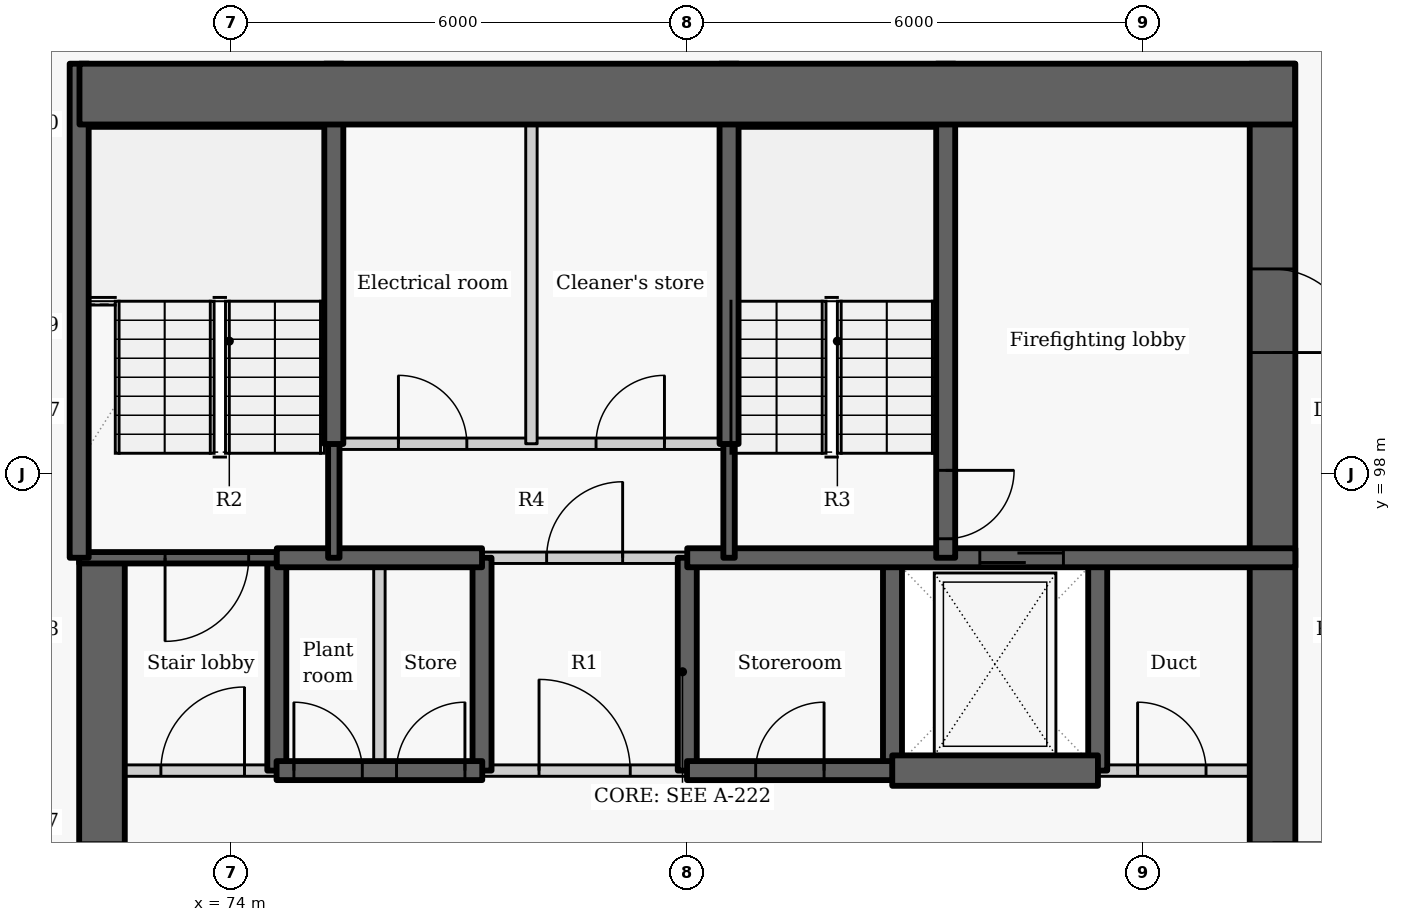
"""IFC4 building model, lengths in metres.
Left out: names, types, materials, properties, quantities, classifications, styles, units other than length and angle.
Written with IfcOpenShell. Run it as: python <this file> out.ifc"""

import sys

from ifc_helpers import new_model, si_unit, direction, frame, frame_2d, origin, place, context, subcontext, project, spatial, rectangle, extrude, element, fill, save


model = new_model("IFC4")
c1 = context("Model", 3, precision=1e-05, world=origin(), true_north=direction((0.0, 1.0)))
c2 = subcontext(c1, "Body", "Model", "MODEL_VIEW")
j1 = project(units=[si_unit("LENGTHUNIT", "METRE"), si_unit("PLANEANGLEUNIT", "RADIAN")], contexts=[c1])
p1 = place(None, origin())
s1 = spatial("IfcSite", under=j1, at=p1, CompositionType="ELEMENT")
p2 = place(p1, origin())
s2 = spatial("IfcBuilding", under=s1, at=p2, CompositionType="ELEMENT")
p3 = place(p2, frame((0.0, 0.0, 117.3)))
s3 = spatial("IfcBuildingStorey", under=s2, at=p3, CompositionType="ELEMENT", Elevation=117.3)
p4 = place(p3, frame((74.6, 94.1, -0.275), z_axis=(0.0, 0.0, 1.0), x_axis=(0.0, 1.0, 0.0)))
e1 = element("IfcWall", 1, at=p4, inside=s3, PredefinedType="SHEAR", context=c2, shape_type="SweptSolid", body=[
    extrude(rectangle(XDim=2.8, YDim=0.25, at=frame_2d((1.4, 0.0))), origin(), (0.0, 0.0, 1.0), 3.225),
])
p5 = place(p3, frame((72.3, 87.8, -0.275), z_axis=(0.0, 0.0, 1.0), x_axis=(0.0, 1.0, 0.0)))
e2 = element("IfcWall", 2, at=p5, inside=s3, PredefinedType="SHEAR", context=c2, shape_type="SweptSolid", body=[
    extrude(rectangle(XDim=9.1, YDim=0.6, at=frame_2d((4.55, 0.0))), origin(), (0.0, 0.0, 1.0), 3.225),
])
p6 = place(p5, frame((3.85, 0.0, 0.275)))
e3 = element("IfcOpeningElement", 3, at=p6, cuts=e2, PredefinedType="OPENING", context=c2, shape_type="SweptSolid", body=[
    extrude(rectangle(XDim=1.5, YDim=2.1, at=frame_2d((0.75, 1.05))), frame((0.0, 0.31, 0.0), z_axis=(0.0, -1.0, 0.0), x_axis=(1.0, 0.0, 0.0)), (0.0, 0.0, 1.0), 0.62),
])
for number, where, z_axis, x_axis in (
    (4, (77.3, 94.1, -0.275), (0.0, 0.0, 1.0), (0.0, 1.0, 0.0)),
    (5, (80.0, 94.1, -0.275), (0.0, 0.0, 1.0), (0.0, 1.0, 0.0)),
    (6, (82.7, 94.1, -0.275), (0.0, 0.0, 1.0), (0.0, 1.0, 0.0)),
    (7, (85.4, 94.1, -0.275), (0.0, 0.0, 1.0), (0.0, 1.0, 0.0)),
):
    element("IfcWall", number, at=place(p3, frame(where, z_axis=z_axis, x_axis=x_axis)), inside=s3, PredefinedType="SHEAR", context=c2, shape_type="SweptSolid", body=[
        extrude(rectangle(XDim=2.8, YDim=0.25, at=frame_2d((1.4, 0.0))), origin(), (0.0, 0.0, 1.0), 3.225),
    ])
p7 = place(p3, frame((87.7, 103.4, -0.275), z_axis=(0.0, 0.0, 1.0), x_axis=(0.0, -1.0, 0.0)))
e8 = element("IfcWall", 8, at=p7, inside=s3, PredefinedType="SHEAR", context=c2, shape_type="SweptSolid", body=[
    extrude(rectangle(XDim=15.6, YDim=0.6, at=frame_2d((7.8, 0.0))), origin(), (0.0, 0.0, 1.0), 3.225),
])
p8 = place(p7, frame((10.25, 0.0, 0.275)))
e9 = element("IfcOpeningElement", 9, at=p8, cuts=e8, PredefinedType="OPENING", context=c2, shape_type="SweptSolid", body=[
    extrude(rectangle(XDim=1.5, YDim=2.1, at=frame_2d((0.75, 1.05))), frame((0.0, 0.31, 0.0), z_axis=(0.0, -1.0, 0.0), x_axis=(1.0, 0.0, 0.0)), (0.0, 0.0, 1.0), 0.62),
])
p9 = place(p7, frame((2.7, 0.0, 0.275)))
e10 = element("IfcOpeningElement", 10, at=p9, cuts=e8, PredefinedType="OPENING", context=c2, shape_type="SweptSolid", body=[
    extrude(rectangle(XDim=1.1, YDim=2.1, at=frame_2d((0.55, 1.05))), frame((0.0, 0.31, 0.0), z_axis=(0.0, -1.0, 0.0), x_axis=(1.0, 0.0, 0.0)), (0.0, 0.0, 1.0), 0.62),
])
p10 = place(p3, frame((72.0, 94.1, 0.0), z_axis=(0.0, 0.0, 1.0), x_axis=(1.0, 0.0, 0.0)))
e11 = element("IfcWall", 11, at=p10, inside=s3, PredefinedType="PARTITIONING", context=c2, shape_type="SweptSolid", body=[
    extrude(rectangle(XDim=2.603, YDim=0.15, at=frame_2d((1.302, 0.0))), origin(), (0.0, 0.0, 1.0), 2.95),
])
p11 = place(p10, frame((1.075, 0.0, 0.0)))
e12 = element("IfcOpeningElement", 12, at=p11, cuts=e11, PredefinedType="OPENING", context=c2, shape_type="SweptSolid", body=[
    extrude(rectangle(XDim=1.1, YDim=2.1, at=frame_2d((0.55, 1.05))), frame((0.0, 0.085, 0.0), z_axis=(0.0, -1.0, 0.0), x_axis=(1.0, 0.0, 0.0)), (0.0, 0.0, 1.0), 0.17),
])
p12 = place(p3, frame((77.297, 94.1, 0.0), z_axis=(0.0, 0.0, 1.0), x_axis=(1.0, 0.0, 0.0)))
e13 = element("IfcWall", 13, at=p12, inside=s3, PredefinedType="PARTITIONING", context=c2, shape_type="SweptSolid", body=[
    extrude(rectangle(XDim=2.706, YDim=0.15, at=frame_2d((1.353, 0.0))), origin(), (0.0, 0.0, 1.0), 2.95),
])
p13 = place(p12, frame((0.753, 0.0, 0.0)))
e14 = element("IfcOpeningElement", 14, at=p13, cuts=e13, PredefinedType="OPENING", context=c2, shape_type="SweptSolid", body=[
    extrude(rectangle(XDim=1.2, YDim=2.1, at=frame_2d((0.6, 1.05))), frame((0.0, 0.085, 0.0), z_axis=(0.0, -1.0, 0.0), x_axis=(1.0, 0.0, 0.0)), (0.0, 0.0, 1.0), 0.17),
])
p14 = place(p3, frame((85.397, 94.1, 0.0), z_axis=(0.0, 0.0, 1.0), x_axis=(1.0, 0.0, 0.0)))
e15 = element("IfcWall", 15, at=p14, inside=s3, PredefinedType="PARTITIONING", context=c2, shape_type="SweptSolid", body=[
    extrude(rectangle(XDim=2.603, YDim=0.15, at=frame_2d((1.302, 0.0))), origin(), (0.0, 0.0, 1.0), 2.95),
])
p15 = place(p14, frame((0.528, 0.0, 0.0)))
e16 = element("IfcOpeningElement", 16, at=p15, cuts=e15, PredefinedType="OPENING", context=c2, shape_type="SweptSolid", body=[
    extrude(rectangle(XDim=0.9, YDim=2.1, at=frame_2d((0.45, 1.05))), frame((0.0, 0.085, 0.0), z_axis=(0.0, -1.0, 0.0), x_axis=(1.0, 0.0, 0.0)), (0.0, 0.0, 1.0), 0.17),
])
p16 = place(p3, frame((74.597, 94.1, -0.275), z_axis=(0.0, 0.0, 1.0), x_axis=(1.0, 0.0, 0.0)))
e17 = element("IfcWall", 17, at=p16, inside=s3, PredefinedType="SHEAR", context=c2, shape_type="SweptSolid", body=[
    extrude(rectangle(XDim=2.706, YDim=0.25, at=frame_2d((1.353, 0.0))), origin(), (0.0, 0.0, 1.0), 3.225),
])
p17 = place(p16, frame((0.228, 0.0, 0.275)))
e18 = element("IfcOpeningElement", 18, at=p17, cuts=e17, PredefinedType="OPENING", context=c2, shape_type="SweptSolid", body=[
    extrude(rectangle(XDim=0.9, YDim=2.1, at=frame_2d((0.45, 1.05))), frame((0.0, 0.135, 0.0), z_axis=(0.0, -1.0, 0.0), x_axis=(1.0, 0.0, 0.0)), (0.0, 0.0, 1.0), 0.27),
])
p18 = place(p16, frame((1.578, 0.0, 0.275)))
e19 = element("IfcOpeningElement", 19, at=p18, cuts=e17, PredefinedType="OPENING", context=c2, shape_type="SweptSolid", body=[
    extrude(rectangle(XDim=0.9, YDim=2.1, at=frame_2d((0.45, 1.05))), frame((0.0, 0.135, 0.0), z_axis=(0.0, -1.0, 0.0), x_axis=(1.0, 0.0, 0.0)), (0.0, 0.0, 1.0), 0.27),
])
p19 = place(p3, frame((79.997, 94.1, -0.275), z_axis=(0.0, 0.0, 1.0), x_axis=(1.0, 0.0, 0.0)))
e20 = element("IfcWall", 20, at=p19, inside=s3, PredefinedType="SHEAR", context=c2, shape_type="SweptSolid", body=[
    extrude(rectangle(XDim=2.706, YDim=0.25, at=frame_2d((1.353, 0.0))), origin(), (0.0, 0.0, 1.0), 3.225),
])
p20 = place(p19, frame((0.903, 0.0, 0.275)))
e21 = element("IfcOpeningElement", 21, at=p20, cuts=e20, PredefinedType="OPENING", context=c2, shape_type="SweptSolid", body=[
    extrude(rectangle(XDim=0.9, YDim=2.1, at=frame_2d((0.45, 1.05))), frame((0.0, 0.135, 0.0), z_axis=(0.0, -1.0, 0.0), x_axis=(1.0, 0.0, 0.0)), (0.0, 0.0, 1.0), 0.27),
])
p21 = place(p3, frame((82.697, 94.1, -0.275), z_axis=(0.0, 0.0, 1.0), x_axis=(1.0, 0.0, 0.0)))
e22 = element("IfcWall", 22, at=p21, inside=s3, PredefinedType="SHEAR", context=c2, shape_type="SweptSolid", body=[
    extrude(rectangle(XDim=2.706, YDim=0.4, at=frame_2d((1.353, 0.0))), origin(), (0.0, 0.0, 1.0), 3.225),
])
p22 = place(p3, frame((74.6, 96.9, -0.275), z_axis=(0.0, 0.0, 1.0), x_axis=(-1.0, 0.0, 0.0)))
e23 = element("IfcWall", 23, at=p22, inside=s3, PredefinedType="SHEAR", context=c2, shape_type="SweptSolid", body=[
    extrude(rectangle(XDim=2.6, YDim=0.15, at=frame_2d((1.3, 0.0))), origin(), (0.0, 0.0, 1.0), 3.225),
])
p23 = place(p22, frame((0.37, 0.0, 0.275)))
e24 = element("IfcOpeningElement", 24, at=p23, cuts=e23, PredefinedType="OPENING", context=c2, shape_type="SweptSolid", body=[
    extrude(rectangle(XDim=1.1, YDim=2.1, at=frame_2d((0.55, 1.05))), frame((0.0, 0.085, 0.0), z_axis=(0.0, -1.0, 0.0), x_axis=(1.0, 0.0, 0.0)), (0.0, 0.0, 1.0), 0.17),
])
p24 = place(p3, frame((75.95, 94.1, 0.0), z_axis=(0.0, 0.0, 1.0), x_axis=(0.0, 1.0, 0.0)))
e25 = element("IfcWall", 25, at=p24, inside=s3, PredefinedType="PARTITIONING", context=c2, shape_type="SweptSolid", body=[
    extrude(rectangle(XDim=2.8, YDim=0.15, at=frame_2d((1.4, 0.0))), origin(), (0.0, 0.0, 1.0), 2.95),
])
p25 = place(p3, frame((74.6, 96.9, -0.275), z_axis=(0.0, 0.0, 1.0), x_axis=(1.0, 0.0, 0.0)))
e26 = element("IfcWall", 26, at=p25, inside=s3, PredefinedType="SHEAR", context=c2, shape_type="SweptSolid", body=[
    extrude(rectangle(XDim=2.7, YDim=0.25, at=frame_2d((1.35, 0.0))), origin(), (0.0, 0.0, 1.0), 3.225),
])
p26 = place(p3, frame((80.0, 96.9, -0.275), z_axis=(0.0, 0.0, 1.0), x_axis=(1.0, 0.0, 0.0)))
e27 = element("IfcWall", 27, at=p26, inside=s3, PredefinedType="SHEAR", context=c2, shape_type="SweptSolid", body=[
    extrude(rectangle(XDim=8.0, YDim=0.25, at=frame_2d((4.0, 0.0))), origin(), (0.0, 0.0, 1.0), 3.225),
])
p27 = place(p26, frame((3.849, 0.0, 0.275)))
e28 = element("IfcOpeningElement", 28, at=p27, cuts=e27, PredefinedType="OPENING", context=c2, shape_type="SweptSolid", body=[
    extrude(rectangle(XDim=1.1, YDim=2.1, at=frame_2d((0.55, 1.05))), frame((0.0, 0.135, 0.0), z_axis=(0.0, -1.0, 0.0), x_axis=(1.0, 0.0, 0.0)), (0.0, 0.0, 1.0), 0.27),
])
p28 = place(p3, frame((77.3, 96.9, 0.0), z_axis=(0.0, 0.0, 1.0), x_axis=(1.0, 0.0, 0.0)))
e29 = element("IfcWall", 29, at=p28, inside=s3, PredefinedType="PARTITIONING", context=c2, shape_type="SweptSolid", body=[
    extrude(rectangle(XDim=2.7, YDim=0.15, at=frame_2d((1.35, 0.0))), origin(), (0.0, 0.0, 1.0), 2.95),
])
p29 = place(p28, frame((0.85, 0.0, 0.0)))
e30 = element("IfcOpeningElement", 30, at=p29, cuts=e29, PredefinedType="OPENING", context=c2, shape_type="SweptSolid", body=[
    extrude(rectangle(XDim=1.0, YDim=2.1, at=frame_2d((0.5, 1.05))), frame((0.0, 0.085, 0.0), z_axis=(0.0, -1.0, 0.0), x_axis=(1.0, 0.0, 0.0)), (0.0, 0.0, 1.0), 0.17),
])
p30 = place(p3, frame((75.35, 96.9, -0.275), z_axis=(0.0, 0.0, 1.0), x_axis=(0.0, 1.0, 0.0)))
e31 = element("IfcWall", 31, at=p30, inside=s3, PredefinedType="SHEAR", context=c2, shape_type="SweptSolid", body=[
    extrude(rectangle(XDim=1.503, YDim=0.15, at=frame_2d((0.751, 0.0))), origin(), (0.0, 0.0, 1.0), 3.225),
])
p31 = place(p3, frame((75.35, 98.397, -0.275), z_axis=(0.0, 0.0, 1.0), x_axis=(0.0, 1.0, 0.0)))
e32 = element("IfcWall", 32, at=p31, inside=s3, PredefinedType="SHEAR", context=c2, shape_type="SweptSolid", body=[
    extrude(rectangle(XDim=5.003, YDim=0.25, at=frame_2d((2.501, 0.0))), origin(), (0.0, 0.0, 1.0), 3.225),
])
p32 = place(p3, frame((72.0, 96.9, -0.275), z_axis=(0.0, 0.0, 1.0), x_axis=(0.0, 1.0, 0.0)))
e33 = element("IfcWall", 33, at=p32, inside=s3, PredefinedType="SHEAR", context=c2, shape_type="SweptSolid", body=[
    extrude(rectangle(XDim=6.5, YDim=0.25, at=frame_2d((3.25, 0.0))), origin(), (0.0, 0.0, 1.0), 3.225),
])
p33 = place(p3, frame((83.4, 103.4, -0.275), z_axis=(0.0, 0.0, 1.0), x_axis=(0.0, -1.0, 0.0)))
e34 = element("IfcWall", 34, at=p33, inside=s3, PredefinedType="SHEAR", context=c2, shape_type="SweptSolid", body=[
    extrude(rectangle(XDim=6.5, YDim=0.25, at=frame_2d((3.25, 0.0))), origin(), (0.0, 0.0, 1.0), 3.225),
])
p34 = place(p33, frame((5.35, 0.0, 0.275)))
e35 = element("IfcOpeningElement", 35, at=p34, cuts=e34, PredefinedType="OPENING", context=c2, shape_type="SweptSolid", body=[
    extrude(rectangle(XDim=0.9, YDim=2.1, at=frame_2d((0.45, 1.05))), frame((0.0, 0.135, 0.0), z_axis=(0.0, -1.0, 0.0), x_axis=(1.0, 0.0, 0.0)), (0.0, 0.0, 1.0), 0.27),
])
p35 = place(p3, frame((80.55, 96.9, -0.275), z_axis=(0.0, 0.0, 1.0), x_axis=(0.0, 1.0, 0.0)))
e36 = element("IfcWall", 36, at=p35, inside=s3, PredefinedType="SHEAR", context=c2, shape_type="SweptSolid", body=[
    extrude(rectangle(XDim=1.503, YDim=0.15, at=frame_2d((0.751, 0.0))), origin(), (0.0, 0.0, 1.0), 3.225),
])
p36 = place(p3, frame((80.55, 98.397, -0.275), z_axis=(0.0, 0.0, 1.0), x_axis=(0.0, 1.0, 0.0)))
e37 = element("IfcWall", 37, at=p36, inside=s3, PredefinedType="SHEAR", context=c2, shape_type="SweptSolid", body=[
    extrude(rectangle(XDim=5.003, YDim=0.25, at=frame_2d((2.501, 0.0))), origin(), (0.0, 0.0, 1.0), 3.225),
])
p37 = place(p3, frame((75.35, 98.4, 0.0), z_axis=(0.0, 0.0, 1.0), x_axis=(1.0, 0.0, 0.0)))
e38 = element("IfcWall", 38, at=p37, inside=s3, PredefinedType="PARTITIONING", context=c2, shape_type="SweptSolid", body=[
    extrude(rectangle(XDim=5.2, YDim=0.15, at=frame_2d((2.6, 0.0))), origin(), (0.0, 0.0, 1.0), 2.95),
])
p38 = place(p37, frame((0.85, 0.0, 0.0)))
e39 = element("IfcOpeningElement", 39, at=p38, cuts=e38, PredefinedType="OPENING", context=c2, shape_type="SweptSolid", body=[
    extrude(rectangle(XDim=0.9, YDim=2.1, at=frame_2d((0.45, 1.05))), frame((0.0, 0.085, 0.0), z_axis=(0.0, -1.0, 0.0), x_axis=(1.0, 0.0, 0.0)), (0.0, 0.0, 1.0), 0.17),
])
p39 = place(p37, frame((3.45, 0.0, 0.0)))
e40 = element("IfcOpeningElement", 40, at=p39, cuts=e38, PredefinedType="OPENING", context=c2, shape_type="SweptSolid", body=[
    extrude(rectangle(XDim=0.9, YDim=2.1, at=frame_2d((0.45, 1.05))), frame((0.0, 0.085, 0.0), z_axis=(0.0, -1.0, 0.0), x_axis=(1.0, 0.0, 0.0)), (0.0, 0.0, 1.0), 0.17),
])
p40 = place(p3, frame((77.95, 98.4, 0.0), z_axis=(0.0, 0.0, 1.0), x_axis=(0.0, 1.0, 0.0)))
e41 = element("IfcWall", 41, at=p40, inside=s3, PredefinedType="PARTITIONING", context=c2, shape_type="SweptSolid", body=[
    extrude(rectangle(XDim=5.0, YDim=0.15, at=frame_2d((2.5, 0.0))), origin(), (0.0, 0.0, 1.0), 2.95),
])
p41 = place(p3, frame((72.004, 103.0, -0.275), z_axis=(0.0, 0.0, 1.0), x_axis=(1.0, 0.0, 0.0)))
e42 = element("IfcWall", 42, at=p41, inside=s3, PredefinedType="SHEAR", context=c2, shape_type="SweptSolid", body=[
    extrude(rectangle(XDim=15.992, YDim=0.8, at=frame_2d((7.996, 0.0))), origin(), (0.0, 0.0, 1.0), 3.225),
])
p42 = place(p11, origin())
e43 = element("IfcDoor", 43, at=p42, inside=s3, OperationType="SINGLE_SWING_RIGHT", PredefinedType="DOOR", context=c2, shape_type="SweptSolid", body=[
    extrude(rectangle(XDim=1.1, YDim=2.1, at=frame_2d((0.55, 1.05))), frame((0.0, 0.025, 0.0), z_axis=(0.0, -1.0, 0.0), x_axis=(1.0, 0.0, 0.0)), (0.0, 0.0, 1.0), 0.05),
])
fill(e12, e43)
p43 = place(p17, origin())
e44 = element("IfcDoor", 44, at=p43, inside=s3, OperationType="SINGLE_SWING_LEFT", PredefinedType="DOOR", context=c2, shape_type="SweptSolid", body=[
    extrude(rectangle(XDim=0.9, YDim=2.1, at=frame_2d((0.45, 1.05))), frame((0.0, 0.025, 0.0), z_axis=(0.0, -1.0, 0.0), x_axis=(1.0, 0.0, 0.0)), (0.0, 0.0, 1.0), 0.05),
])
fill(e18, e44)
p44 = place(p18, origin())
e45 = element("IfcDoor", 45, at=p44, inside=s3, OperationType="SINGLE_SWING_RIGHT", PredefinedType="DOOR", context=c2, shape_type="SweptSolid", body=[
    extrude(rectangle(XDim=0.9, YDim=2.1, at=frame_2d((0.45, 1.05))), frame((0.0, 0.025, 0.0), z_axis=(0.0, -1.0, 0.0), x_axis=(1.0, 0.0, 0.0)), (0.0, 0.0, 1.0), 0.05),
])
fill(e19, e45)
p45 = place(p13, origin())
e46 = element("IfcDoor", 46, at=p45, inside=s3, OperationType="DOUBLE_DOOR_SINGLE_SWING", PredefinedType="DOOR", context=c2, shape_type="SweptSolid", body=[
    extrude(rectangle(XDim=1.2, YDim=2.1, at=frame_2d((0.6, 1.05))), frame((0.0, 0.025, 0.0), z_axis=(0.0, -1.0, 0.0), x_axis=(1.0, 0.0, 0.0)), (0.0, 0.0, 1.0), 0.05),
])
fill(e14, e46)
p46 = place(p20, origin())
e47 = element("IfcDoor", 47, at=p46, inside=s3, OperationType="SINGLE_SWING_RIGHT", PredefinedType="DOOR", context=c2, shape_type="SweptSolid", body=[
    extrude(rectangle(XDim=0.9, YDim=2.1, at=frame_2d((0.45, 1.05))), frame((0.0, 0.025, 0.0), z_axis=(0.0, -1.0, 0.0), x_axis=(1.0, 0.0, 0.0)), (0.0, 0.0, 1.0), 0.05),
])
fill(e21, e47)
p47 = place(p27, origin())
e48 = element("IfcDoor", 48, at=p47, inside=s3, OperationType="SLIDING_TO_LEFT", PredefinedType="DOOR", context=c2, shape_type="SweptSolid", body=[
    extrude(rectangle(XDim=1.1, YDim=2.1, at=frame_2d((0.55, 1.05))), frame((0.0, 0.025, 0.0), z_axis=(0.0, -1.0, 0.0), x_axis=(1.0, 0.0, 0.0)), (0.0, 0.0, 1.0), 0.05),
])
fill(e28, e48)
p48 = place(p15, origin())
e49 = element("IfcDoor", 49, at=p48, inside=s3, OperationType="SINGLE_SWING_LEFT", PredefinedType="DOOR", context=c2, shape_type="SweptSolid", body=[
    extrude(rectangle(XDim=0.9, YDim=2.1, at=frame_2d((0.45, 1.05))), frame((0.0, 0.025, 0.0), z_axis=(0.0, -1.0, 0.0), x_axis=(1.0, 0.0, 0.0)), (0.0, 0.0, 1.0), 0.05),
])
fill(e16, e49)
p49 = place(p29, origin())
e50 = element("IfcDoor", 50, at=p49, inside=s3, OperationType="SINGLE_SWING_RIGHT", PredefinedType="DOOR", context=c2, shape_type="SweptSolid", body=[
    extrude(rectangle(XDim=1.0, YDim=2.1, at=frame_2d((0.5, 1.05))), frame((0.0, 0.025, 0.0), z_axis=(0.0, -1.0, 0.0), x_axis=(1.0, 0.0, 0.0)), (0.0, 0.0, 1.0), 0.05),
])
fill(e30, e50)
p50 = place(p38, origin())
e51 = element("IfcDoor", 51, at=p50, inside=s3, OperationType="SINGLE_SWING_LEFT", PredefinedType="DOOR", context=c2, shape_type="SweptSolid", body=[
    extrude(rectangle(XDim=0.9, YDim=2.1, at=frame_2d((0.45, 1.05))), frame((0.0, 0.025, 0.0), z_axis=(0.0, -1.0, 0.0), x_axis=(1.0, 0.0, 0.0)), (0.0, 0.0, 1.0), 0.05),
])
fill(e39, e51)
p51 = place(p39, origin())
e52 = element("IfcDoor", 52, at=p51, inside=s3, OperationType="SINGLE_SWING_RIGHT", PredefinedType="DOOR", context=c2, shape_type="SweptSolid", body=[
    extrude(rectangle(XDim=0.9, YDim=2.1, at=frame_2d((0.45, 1.05))), frame((0.0, 0.025, 0.0), z_axis=(0.0, -1.0, 0.0), x_axis=(1.0, 0.0, 0.0)), (0.0, 0.0, 1.0), 0.05),
])
fill(e40, e52)
p52 = place(p23, origin())
e53 = element("IfcDoor", 53, at=p52, inside=s3, OperationType="SINGLE_SWING_RIGHT", PredefinedType="DOOR", context=c2, shape_type="SweptSolid", body=[
    extrude(rectangle(XDim=1.1, YDim=2.1, at=frame_2d((0.55, 1.05))), frame((0.0, 0.025, 0.0), z_axis=(0.0, -1.0, 0.0), x_axis=(1.0, 0.0, 0.0)), (0.0, 0.0, 1.0), 0.05),
])
fill(e24, e53)
p53 = place(p34, origin())
e54 = element("IfcDoor", 54, at=p53, inside=s3, OperationType="SINGLE_SWING_LEFT", PredefinedType="DOOR", context=c2, shape_type="SweptSolid", body=[
    extrude(rectangle(XDim=0.9, YDim=2.1, at=frame_2d((0.45, 1.05))), frame((0.0, 0.025, 0.0), z_axis=(0.0, -1.0, 0.0), x_axis=(1.0, 0.0, 0.0)), (0.0, 0.0, 1.0), 0.05),
])
fill(e35, e54)
p54 = place(p6, origin())
e55 = element("IfcDoor", 55, at=p54, inside=s3, OperationType="DOUBLE_DOOR_SINGLE_SWING", PredefinedType="DOOR", context=c2, shape_type="SweptSolid", body=[
    extrude(rectangle(XDim=1.5, YDim=2.1, at=frame_2d((0.75, 1.05))), frame((0.0, 0.025, 0.0), z_axis=(0.0, -1.0, 0.0), x_axis=(1.0, 0.0, 0.0)), (0.0, 0.0, 1.0), 0.05),
])
fill(e3, e55)
p55 = place(p9, origin())
e56 = element("IfcDoor", 56, at=p55, inside=s3, OperationType="SINGLE_SWING_RIGHT", PredefinedType="DOOR", context=c2, shape_type="SweptSolid", body=[
    extrude(rectangle(XDim=1.1, YDim=2.1, at=frame_2d((0.55, 1.05))), frame((0.0, 0.025, 0.0), z_axis=(0.0, -1.0, 0.0), x_axis=(1.0, 0.0, 0.0)), (0.0, 0.0, 1.0), 0.05),
])
fill(e10, e56)
save(model, sys.argv[1])
